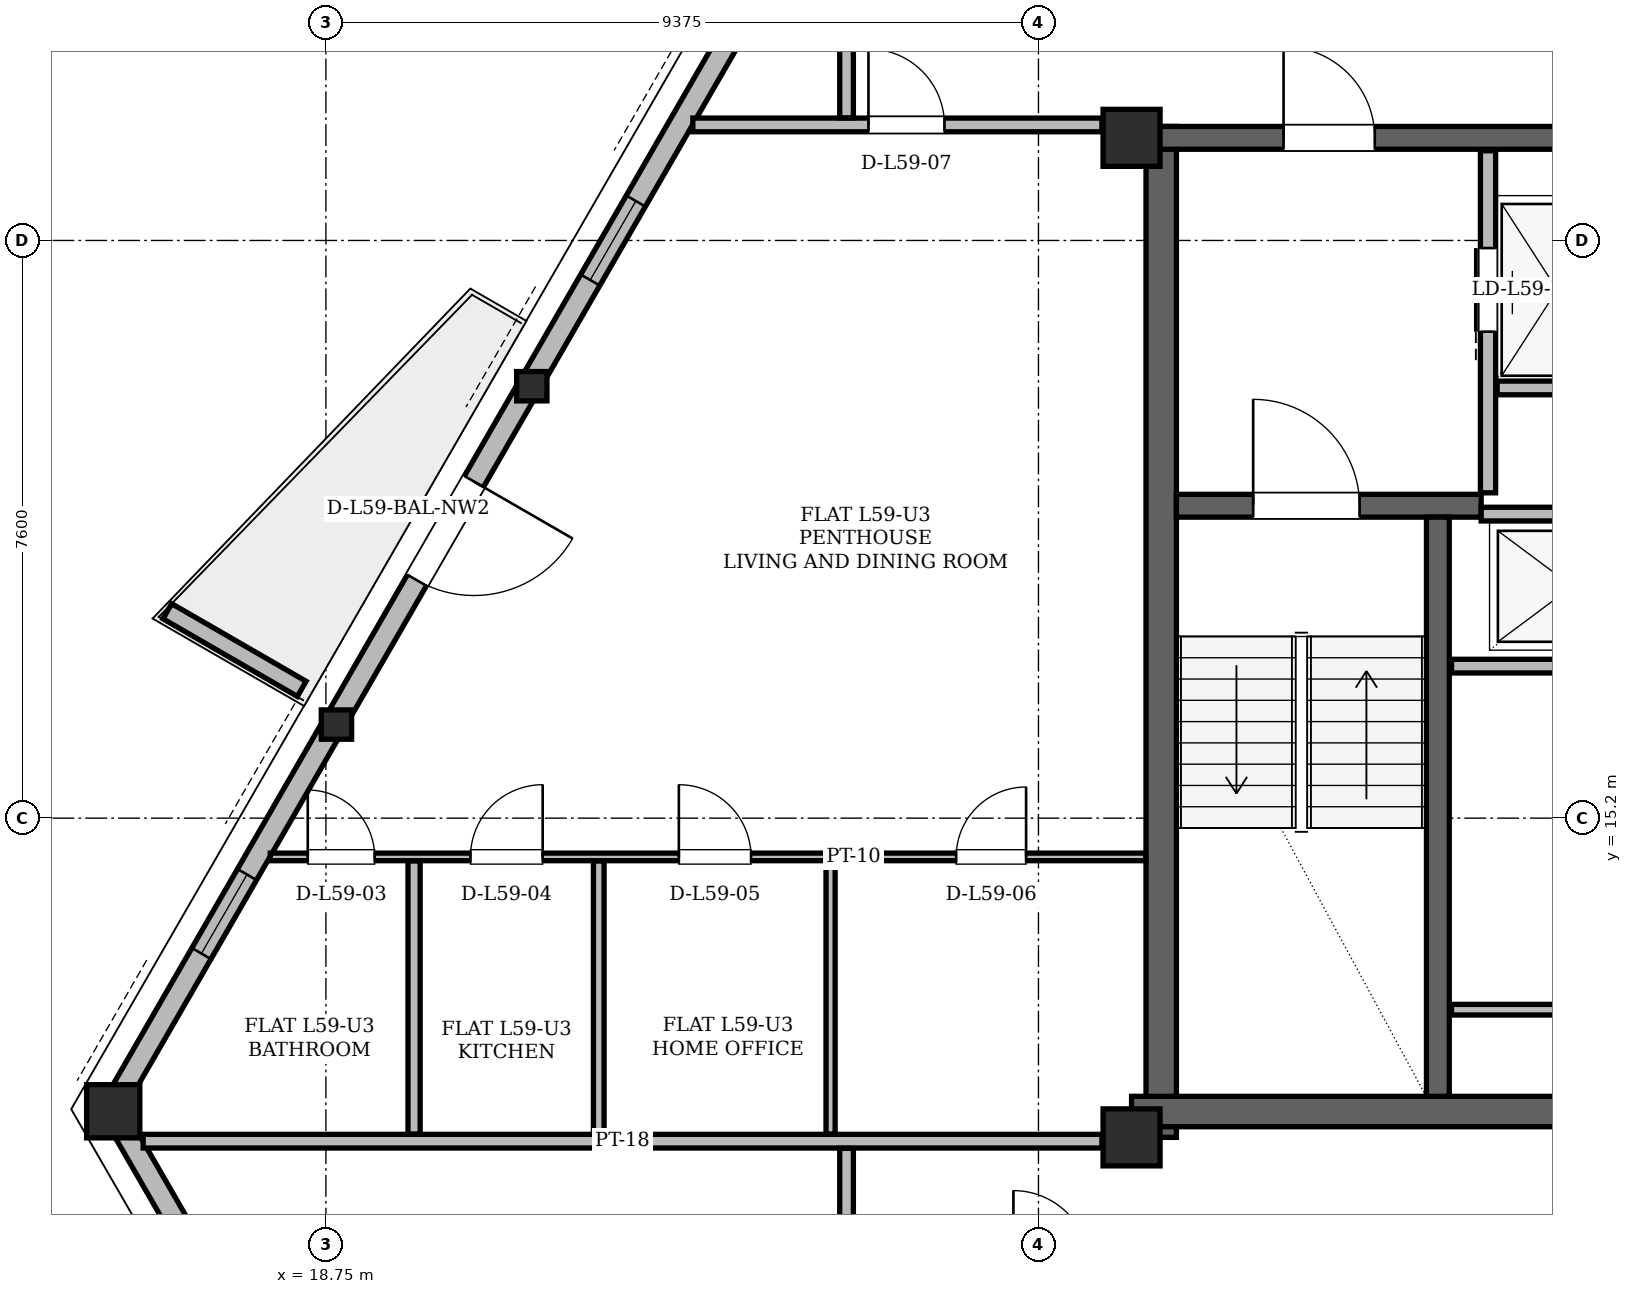
"""IFC4 building model, lengths in metres.
Left out: names, types, materials, properties, quantities, classifications, styles, units other than length and angle.
Written with IfcOpenShell. Run it as: python <this file> out.ifc"""

import sys

from ifc_helpers import new_model, si_unit, direction, frame, frame_2d, origin, origin_2d, place, context, subcontext, project, spatial, polyline, rectangle, hollow_rectangle, i_section, outline, extrude, element, fill, save


model = new_model("IFC4")
c1 = context("Model", 3, precision=1e-05, world=origin(), true_north=direction((0.0, 1.0)))
c2 = subcontext(c1, "Body", "Model", "MODEL_VIEW")
j1 = project(units=[si_unit("LENGTHUNIT", "METRE"), si_unit("PLANEANGLEUNIT", "RADIAN")], contexts=[c1])
p1 = place(None, origin())
s1 = spatial("IfcSite", under=j1, at=p1, CompositionType="ELEMENT")
p2 = place(p1, origin())
s2 = spatial("IfcBuilding", under=s1, at=p2, CompositionType="ELEMENT")
p3 = place(p2, frame((0.0, 0.0, 223.5)))
s3 = spatial("IfcBuildingStorey", under=s2, at=p3, CompositionType="ELEMENT", Elevation=223.5)
for number, where, z_axis, x_axis in (
    (1, (29.35, 11.0, 0.0), (0.0, 0.0, 1.0), (1.0, 0.0, 0.0)),
    (2, (29.35, 24.15, 0.0), (0.0, 0.0, 1.0), (1.0, 0.0, 0.0)),
):
    element("IfcColumn", number, at=place(p3, frame(where, z_axis=z_axis, x_axis=x_axis)), inside=s3, PredefinedType="COLUMN", context=c2, shape_type="SweptSolid", body=[
        extrude(hollow_rectangle(XDim=0.75, YDim=0.75, WallThickness=0.06, at=origin_2d()), origin(), (0.0, 0.0, 1.0), 3.6),
    ])
p4 = place(p3, frame((15.93, 11.372, 0.004), z_axis=(0.01203111998, -0.015565686302, 0.999806462053), x_axis=(0.791209010754, 0.611545829273, 0.0)))
e3 = element("IfcColumn", 3, at=p4, inside=s3, PredefinedType="COLUMN", context=c2, shape_type="SweptSolid", body=[
    extrude(hollow_rectangle(XDim=0.7, YDim=0.7, WallThickness=0.055, at=origin_2d()), origin(), (0.0, 0.0, 1.0), 3.592),
])
p5 = place(p3, frame((21.433, 20.903, 0.004), z_axis=(0.014274554057, -0.011623565446, 0.99983055056), x_axis=(0.63142634321, 0.775435860082, 0.0)))
e4 = element("IfcColumn", 4, at=p5, inside=s3, PredefinedType="COLUMN", context=c2, shape_type="SweptSolid", body=[
    extrude(i_section(OverallWidth=0.399, OverallDepth=0.386, WebThickness=0.021, FlangeThickness=0.033, at=origin_2d()), origin(), (0.0, 0.0, 1.0), 3.592),
])
p6 = place(p3, frame((18.865, 16.455, 0.004), z_axis=(0.01318686239, -0.01345875646, 0.999822468509), x_axis=(0.714284970625, 0.699854971218, 0.0)))
e5 = element("IfcColumn", 5, at=p6, inside=s3, PredefinedType="COLUMN", context=c2, shape_type="SweptSolid", body=[
    extrude(i_section(OverallWidth=0.399, OverallDepth=0.386, WebThickness=0.021, FlangeThickness=0.033, at=origin_2d()), origin(), (0.0, 0.0, 1.0), 3.592),
])
p7 = place(p3, frame((29.74, 11.0, 0.0), z_axis=(0.0, 0.0, 1.0), x_axis=(0.0, 1.0, 0.0)))
e6 = element("IfcWall", 6, at=p7, inside=s3, PredefinedType="SHEAR", context=c2, shape_type="SweptSolid", body=[
    extrude(rectangle(XDim=13.3, YDim=0.4, at=frame_2d((6.65, 0.0))), origin(), (0.0, 0.0, 1.0), 3.38),
])
p8 = place(p3, frame((29.35, 11.34, 0.0), z_axis=(0.0, 0.0, 1.0), x_axis=(1.0, 0.0, 0.0)))
e7 = element("IfcWall", 7, at=p8, inside=s3, PredefinedType="SHEAR", context=c2, shape_type="SweptSolid", body=[
    extrude(rectangle(XDim=7.1, YDim=0.4, at=frame_2d((3.55, 0.0))), origin(), (0.0, 0.0, 1.0), 3.38),
])
p9 = place(p3, frame((29.65, 24.15, 0.0), z_axis=(0.0, 0.0, 1.0), x_axis=(1.0, 0.0, 0.0)))
e8 = element("IfcWall", 8, at=p9, inside=s3, PredefinedType="SHEAR", context=c2, shape_type="SweptSolid", body=[
    extrude(rectangle(XDim=15.7, YDim=0.3, at=frame_2d((7.85, 0.0))), origin(), (0.0, 0.0, 1.0), 3.38),
])
p10 = place(p9, frame((1.7, 0.0, 0.0)))
e9 = element("IfcOpeningElement", 9, at=p10, cuts=e8, PredefinedType="OPENING", context=c2, shape_type="SweptSolid", body=[
    extrude(rectangle(XDim=1.2, YDim=2.2, at=frame_2d((0.6, 1.1))), frame((0.0, 0.15, 0.0), z_axis=(0.0, -1.0, 0.0), x_axis=(1.0, 0.0, 0.0)), (0.0, 0.0, 1.0), 0.3),
])
p11 = place(p9, frame((12.8, 0.0, 0.0)))
e10 = element("IfcOpeningElement", 10, at=p11, cuts=e8, PredefinedType="OPENING", context=c2, shape_type="SweptSolid", body=[
    extrude(rectangle(XDim=1.2, YDim=2.2, at=frame_2d((0.6, 1.1))), frame((0.0, 0.15, 0.0), z_axis=(0.0, -1.0, 0.0), x_axis=(1.0, 0.0, 0.0)), (0.0, 0.0, 1.0), 0.3),
])
p12 = place(p9, frame((6.55, 0.0, 0.0)))
e11 = element("IfcOpeningElement", 11, at=p12, cuts=e8, PredefinedType="OPENING", context=c2, shape_type="SweptSolid", body=[
    extrude(rectangle(XDim=0.9, YDim=2.05, at=frame_2d((0.45, 1.025))), frame((0.0, 0.15, 0.0), z_axis=(0.0, -1.0, 0.0), x_axis=(1.0, 0.0, 0.0)), (0.0, 0.0, 1.0), 0.3),
])
p13 = place(p9, frame((8.45, 0.0, 0.0)))
e12 = element("IfcOpeningElement", 12, at=p13, cuts=e8, PredefinedType="OPENING", context=c2, shape_type="SweptSolid", body=[
    extrude(rectangle(XDim=0.9, YDim=2.05, at=frame_2d((0.45, 1.025))), frame((0.0, 0.15, 0.0), z_axis=(0.0, -1.0, 0.0), x_axis=(1.0, 0.0, 0.0)), (0.0, 0.0, 1.0), 0.3),
])
p14 = place(p3, frame((29.94, 19.31, 0.0), z_axis=(0.0, 0.0, 1.0), x_axis=(1.0, 0.0, 0.0)))
e13 = element("IfcWall", 13, at=p14, inside=s3, PredefinedType="SHEAR", context=c2, shape_type="SweptSolid", body=[
    extrude(rectangle(XDim=4.01, YDim=0.3, at=frame_2d((2.005, 0.0))), origin(), (0.0, 0.0, 1.0), 3.38),
])
p15 = place(p14, frame((1.01, 0.0, 0.0)))
e14 = element("IfcOpeningElement", 14, at=p15, cuts=e13, PredefinedType="OPENING", context=c2, shape_type="SweptSolid", body=[
    extrude(rectangle(XDim=1.4, YDim=2.2, at=frame_2d((0.7, 1.1))), frame((0.0, 0.15, 0.0), z_axis=(0.0, -1.0, 0.0), x_axis=(1.0, 0.0, 0.0)), (0.0, 0.0, 1.0), 0.3),
])
p16 = place(p3, frame((33.38, 11.54, 0.0), z_axis=(0.0, 0.0, 1.0), x_axis=(0.0, 1.0, 0.0)))
e15 = element("IfcWall", 15, at=p16, inside=s3, PredefinedType="SHEAR", context=c2, shape_type="SweptSolid", body=[
    extrude(rectangle(XDim=7.62, YDim=0.3, at=frame_2d((3.81, 0.0))), origin(), (0.0, 0.0, 1.0), 3.38),
])
p17 = place(p3, frame((15.93, 11.372, 0.0), z_axis=(0.0, 0.0, 1.0), x_axis=(0.500005232821, -0.866022382593, 0.0)))
e16 = element("IfcWall", 16, at=p17, inside=s3, PredefinedType="SOLIDWALL", context=c2, shape_type="SweptSolid", body=[
    extrude(rectangle(XDim=6.452, YDim=0.29, at=frame_2d((3.226, 0.0))), origin(), (0.0, 0.0, 1.0), 2.677),
])
p18 = place(p3, frame((34.274, 43.144, 0.0), z_axis=(0.0, 0.0, 1.0), x_axis=(-0.500000292553, -0.866025234879, 0.0)))
e17 = element("IfcWall", 17, at=p18, inside=s3, PredefinedType="SOLIDWALL", context=c2, shape_type="SweptSolid", body=[
    extrude(rectangle(XDim=36.688, YDim=0.29, at=frame_2d((18.344, 0.0))), origin(), (0.0, 0.0, 1.0), 2.677),
])
p19 = place(p18, frame((3.429, 0.0, 0.0)))
e18 = element("IfcOpeningElement", 18, at=p19, cuts=e17, PredefinedType="OPENING", context=c2, shape_type="SweptSolid", body=[
    extrude(rectangle(XDim=1.5, YDim=2.2, at=frame_2d((0.75, 1.1))), frame((0.0, 0.145, 0.0), z_axis=(0.0, -1.0, 0.0), x_axis=(1.0, 0.0, 0.0)), (0.0, 0.0, 1.0), 0.29),
])
p20 = place(p18, frame((27.154, 0.0, 0.0)))
e19 = element("IfcOpeningElement", 19, at=p20, cuts=e17, PredefinedType="OPENING", context=c2, shape_type="SweptSolid", body=[
    extrude(rectangle(XDim=1.5, YDim=2.2, at=frame_2d((0.75, 1.1))), frame((0.0, 0.145, 0.0), z_axis=(0.0, -1.0, 0.0), x_axis=(1.0, 0.0, 0.0)), (0.0, 0.0, 1.0), 0.29),
])
p21 = place(p18, frame((22.893, 0.0, 0.85)))
e20 = element("IfcOpeningElement", 20, at=p21, cuts=e17, PredefinedType="OPENING", context=c2, shape_type="SweptSolid", body=[
    extrude(rectangle(XDim=1.2, YDim=1.48, at=frame_2d((0.6, 0.74))), frame((0.0, 0.145, 0.0), z_axis=(0.0, -1.0, 0.0), x_axis=(1.0, 0.0, 0.0)), (0.0, 0.0, 1.0), 0.29),
])
p22 = place(p18, frame((33.124, 0.0, 0.85)))
e21 = element("IfcOpeningElement", 21, at=p22, cuts=e17, PredefinedType="OPENING", context=c2, shape_type="SweptSolid", body=[
    extrude(rectangle(XDim=1.2, YDim=1.48, at=frame_2d((0.6, 0.74))), frame((0.0, 0.145, 0.0), z_axis=(0.0, -1.0, 0.0), x_axis=(1.0, 0.0, 0.0)), (0.0, 0.0, 1.0), 0.29),
])
p23 = place(p18, frame((8.469, 0.0, 0.85)))
e22 = element("IfcOpeningElement", 22, at=p23, cuts=e17, PredefinedType="OPENING", context=c2, shape_type="SweptSolid", body=[
    extrude(rectangle(XDim=1.2, YDim=1.48, at=frame_2d((0.6, 0.74))), frame((0.0, 0.145, 0.0), z_axis=(0.0, -1.0, 0.0), x_axis=(1.0, 0.0, 0.0)), (0.0, 0.0, 1.0), 0.29),
])
p24 = place(p18, frame((15.521, 0.0, 0.85)))
e23 = element("IfcOpeningElement", 23, at=p24, cuts=e17, PredefinedType="OPENING", context=c2, shape_type="SweptSolid", body=[
    extrude(rectangle(XDim=2.8, YDim=1.717, at=frame_2d((1.4, 0.858))), frame((0.0, 0.145, 0.0), z_axis=(0.0, -1.0, 0.0), x_axis=(1.0, 0.0, 0.0)), (0.0, 0.0, 1.0), 0.29),
])
p25 = place(p18, frame((1.499, 0.0, 0.85)))
e24 = element("IfcOpeningElement", 24, at=p25, cuts=e17, PredefinedType="OPENING", context=c2, shape_type="SweptSolid", body=[
    extrude(rectangle(XDim=1.2, YDim=1.48, at=frame_2d((0.6, 0.74))), frame((0.0, 0.145, 0.0), z_axis=(0.0, -1.0, 0.0), x_axis=(1.0, 0.0, 0.0)), (0.0, 0.0, 1.0), 0.29),
])
p26 = place(p3, frame((18.432, 16.901, 0.0), z_axis=(0.0, 0.0, 1.0), x_axis=(-0.866042246008, 0.499970827278, 0.0)))
e25 = element("IfcWall", 25, at=p26, inside=s3, PredefinedType="PARAPET", context=c2, shape_type="SweptSolid", body=[
    extrude(outline(polyline([(0.0, 0.0), (2.042, 0.0), (2.042, 1.1), (0.0, 1.32), (0.0, 0.0)])), frame((0.0, 0.115, 0.0), z_axis=(0.0, -1.0, 0.0), x_axis=(1.0, 0.0, 0.0)), (0.0, 0.0, 1.0), 0.23),
])
p27 = place(p3, frame((34.04, 19.48, 0.0), z_axis=(0.0, 0.0, 1.0), x_axis=(0.0, 1.0, 0.0)))
e26 = element("IfcWall", 26, at=p27, inside=s3, PredefinedType="PARTITIONING", context=c2, shape_type="SweptSolid", body=[
    extrude(rectangle(XDim=4.5, YDim=0.2, at=frame_2d((2.25, 0.0))), origin(), (0.0, 0.0, 1.0), 3.38),
])
p28 = place(p27, frame((2.12, 0.0, 0.0)))
e27 = element("IfcOpeningElement", 27, at=p28, cuts=e26, PredefinedType="OPENING", context=c2, shape_type="SweptSolid", body=[
    extrude(rectangle(XDim=1.1, YDim=2.2, at=frame_2d((0.55, 1.1))), frame((0.0, 0.1, 0.0), z_axis=(0.0, -1.0, 0.0), x_axis=(1.0, 0.0, 0.0)), (0.0, 0.0, 1.0), 0.2),
])
p29 = place(p3, frame((34.16, 20.86, 0.0), z_axis=(0.0, 0.0, 1.0), x_axis=(1.0, 0.0, 0.0)))
e28 = element("IfcWall", 28, at=p29, inside=s3, PredefinedType="PARTITIONING", context=c2, shape_type="SweptSolid", body=[
    extrude(rectangle(XDim=1.58, YDim=0.18, at=frame_2d((0.79, 0.0))), origin(), (0.0, 0.0, 1.0), 3.38),
])
p30 = place(p3, frame((33.95, 19.2, 0.0), z_axis=(0.0, 0.0, 1.0), x_axis=(1.0, 0.0, 0.0)))
e29 = element("IfcWall", 29, at=p30, inside=s3, PredefinedType="PARTITIONING", context=c2, shape_type="SweptSolid", body=[
    extrude(rectangle(XDim=2.27, YDim=0.18, at=frame_2d((1.135, 0.0))), origin(), (0.0, 0.0, 1.0), 3.38),
])
p31 = place(p3, frame((33.56, 17.2, 0.0), z_axis=(0.0, 0.0, 1.0), x_axis=(1.0, 0.0, 0.0)))
e30 = element("IfcWall", 30, at=p31, inside=s3, PredefinedType="PARTITIONING", context=c2, shape_type="SweptSolid", body=[
    extrude(rectangle(XDim=2.66, YDim=0.18, at=frame_2d((1.33, 0.0))), origin(), (0.0, 0.0, 1.0), 3.38),
])
p32 = place(p3, frame((33.56, 12.68, 0.0), z_axis=(0.0, 0.0, 1.0), x_axis=(1.0, 0.0, 0.0)))
e31 = element("IfcWall", 31, at=p32, inside=s3, PredefinedType="PARTITIONING", context=c2, shape_type="SweptSolid", body=[
    extrude(rectangle(XDim=2.66, YDim=0.14, at=frame_2d((1.33, 0.0))), origin(), (0.0, 0.0, 1.0), 3.38),
])
p33 = place(p3, frame((16.345, 10.95, 0.0), z_axis=(0.0, 0.0, 1.0), x_axis=(1.0, 0.0, 0.0)))
e32 = element("IfcWall", 32, at=p33, inside=s3, PredefinedType="PARTITIONING", context=c2, shape_type="SweptSolid", body=[
    extrude(rectangle(XDim=12.615, YDim=0.18, at=frame_2d((6.307, 0.0))), origin(), (0.0, 0.0, 1.0), 2.913),
])
p34 = place(p3, frame((18.018, 14.69, 0.0), z_axis=(0.0, 0.0, 1.0), x_axis=(1.0, 0.0, 0.0)))
e33 = element("IfcWall", 33, at=p34, inside=s3, PredefinedType="PARTITIONING", context=c2, shape_type="SweptSolid", body=[
    extrude(rectangle(XDim=11.518, YDim=0.1, at=frame_2d((5.759, 0.0))), origin(), (0.0, 0.0, 1.0), 2.52),
])
p35 = place(p34, frame((0.493, 0.0, 0.0)))
e34 = element("IfcOpeningElement", 34, at=p35, cuts=e33, PredefinedType="OPENING", context=c2, shape_type="SweptSolid", body=[
    extrude(rectangle(XDim=0.88, YDim=2.08, at=frame_2d((0.44, 1.04))), frame((0.0, 0.05, 0.0), z_axis=(0.0, -1.0, 0.0), x_axis=(1.0, 0.0, 0.0)), (0.0, 0.0, 1.0), 0.1),
])
p36 = place(p34, frame((2.634, 0.0, 0.0)))
e35 = element("IfcOpeningElement", 35, at=p36, cuts=e33, PredefinedType="OPENING", context=c2, shape_type="SweptSolid", body=[
    extrude(rectangle(XDim=0.95, YDim=2.1, at=frame_2d((0.475, 1.05))), frame((0.0, 0.05, 0.0), z_axis=(0.0, -1.0, 0.0), x_axis=(1.0, 0.0, 0.0)), (0.0, 0.0, 1.0), 0.1),
])
p37 = place(p34, frame((5.376, 0.0, 0.0)))
e36 = element("IfcOpeningElement", 36, at=p37, cuts=e33, PredefinedType="OPENING", context=c2, shape_type="SweptSolid", body=[
    extrude(rectangle(XDim=0.95, YDim=2.1, at=frame_2d((0.475, 1.05))), frame((0.0, 0.05, 0.0), z_axis=(0.0, -1.0, 0.0), x_axis=(1.0, 0.0, 0.0)), (0.0, 0.0, 1.0), 0.1),
])
p38 = place(p34, frame((9.024, 0.0, 0.0)))
e37 = element("IfcOpeningElement", 37, at=p38, cuts=e33, PredefinedType="OPENING", context=c2, shape_type="SweptSolid", body=[
    extrude(rectangle(XDim=0.92, YDim=2.12, at=frame_2d((0.46, 1.06))), frame((0.0, 0.05, 0.0), z_axis=(0.0, -1.0, 0.0), x_axis=(1.0, 0.0, 0.0)), (0.0, 0.0, 1.0), 0.1),
])
p39 = place(p3, frame((23.578, 24.32, 0.0), z_axis=(0.0, 0.0, 1.0), x_axis=(1.0, 0.0, 0.0)))
e38 = element("IfcWall", 38, at=p39, inside=s3, PredefinedType="PARTITIONING", context=c2, shape_type="SweptSolid", body=[
    extrude(rectangle(XDim=5.382, YDim=0.18, at=frame_2d((2.691, 0.0))), origin(), (0.0, 0.0, 1.0), 3.38),
])
p40 = place(p39, frame((2.31, 0.0, 0.0)))
e39 = element("IfcOpeningElement", 39, at=p40, cuts=e38, PredefinedType="OPENING", context=c2, shape_type="SweptSolid", body=[
    extrude(rectangle(XDim=1.0, YDim=2.18, at=frame_2d((0.5, 1.09))), frame((0.0, 0.09, 0.0), z_axis=(0.0, -1.0, 0.0), x_axis=(1.0, 0.0, 0.0)), (0.0, 0.0, 1.0), 0.18),
])
p41 = place(p3, frame((19.91, 11.044, 0.0), z_axis=(0.0, 0.0, 1.0), x_axis=(0.0, 1.0, 0.0)))
e40 = element("IfcWall", 40, at=p41, inside=s3, PredefinedType="PARTITIONING", context=c2, shape_type="SweptSolid", body=[
    extrude(rectangle(XDim=3.592, YDim=0.16, at=frame_2d((1.796, 0.0))), origin(), (0.0, 0.0, 1.0), 2.913),
])
p42 = place(p3, frame((22.34, 11.044, 0.0), z_axis=(0.0, 0.0, 1.0), x_axis=(0.0, 1.0, 0.0)))
e41 = element("IfcWall", 41, at=p42, inside=s3, PredefinedType="PARTITIONING", context=c2, shape_type="SweptSolid", body=[
    extrude(rectangle(XDim=3.592, YDim=0.14, at=frame_2d((1.796, 0.0))), origin(), (0.0, 0.0, 1.0), 2.913),
])
p43 = place(p3, frame((25.39, 11.044, 0.0), z_axis=(0.0, 0.0, 1.0), x_axis=(0.0, 1.0, 0.0)))
e42 = element("IfcWall", 42, at=p43, inside=s3, PredefinedType="PARTITIONING", context=c2, shape_type="SweptSolid", body=[
    extrude(rectangle(XDim=3.592, YDim=0.12, at=frame_2d((1.796, 0.0))), origin(), (0.0, 0.0, 1.0), 3.38),
])
for number, where, z_axis, x_axis in (
    (43, (25.6, 9.394, 0.0), (0.0, 0.0, 1.0), (0.0, 1.0, 0.0)),
    (44, (25.6, 24.414, 0.0), (0.0, 0.0, 1.0), (0.0, 1.0, 0.0)),
):
    element("IfcWall", number, at=place(p3, frame(where, z_axis=z_axis, x_axis=x_axis)), inside=s3, PredefinedType="PARTITIONING", context=c2, shape_type="SweptSolid", body=[
        extrude(rectangle(XDim=1.462, YDim=0.18, at=frame_2d((0.731, 0.0))), origin(), (0.0, 0.0, 1.0), 3.38),
    ])
p44 = place(p20, origin())
e45 = element("IfcDoor", 45, at=p44, inside=s3, OperationType="SINGLE_SWING_LEFT", PredefinedType="DOOR", context=c2, shape_type="SweptSolid", body=[
    extrude(rectangle(XDim=1.5, YDim=2.2, at=frame_2d((0.75, 1.1))), frame((0.0, 0.025, 0.0), z_axis=(0.0, -1.0, 0.0), x_axis=(1.0, 0.0, 0.0)), (0.0, 0.0, 1.0), 0.05),
])
fill(e19, e45)
p45 = place(p21, origin())
e46 = element("IfcWindow", 46, at=p45, inside=s3, PartitioningType="SINGLE_PANEL", PredefinedType="WINDOW", context=c2, shape_type="SweptSolid", body=[
    extrude(rectangle(XDim=1.2, YDim=1.48, at=frame_2d((0.6, 0.74))), frame((0.0, 0.03, 0.0), z_axis=(0.0, -1.0, 0.0), x_axis=(1.0, 0.0, 0.0)), (0.0, 0.0, 1.0), 0.06),
])
fill(e20, e46)
p46 = place(p22, origin())
e47 = element("IfcWindow", 47, at=p46, inside=s3, PartitioningType="SINGLE_PANEL", PredefinedType="WINDOW", context=c2, shape_type="SweptSolid", body=[
    extrude(rectangle(XDim=1.2, YDim=1.48, at=frame_2d((0.6, 0.74))), frame((0.0, 0.03, 0.0), z_axis=(0.0, -1.0, 0.0), x_axis=(1.0, 0.0, 0.0)), (0.0, 0.0, 1.0), 0.06),
])
fill(e21, e47)
p47 = place(p28, origin())
e48 = element("IfcDoor", 48, at=p47, inside=s3, OperationType="SLIDING_TO_LEFT", PredefinedType="DOOR", context=c2, shape_type="SweptSolid", body=[
    extrude(rectangle(XDim=1.1, YDim=2.2, at=frame_2d((0.55, 1.1))), frame((0.0, 0.025, 0.0), z_axis=(0.0, -1.0, 0.0), x_axis=(1.0, 0.0, 0.0)), (0.0, 0.0, 1.0), 0.05),
])
fill(e27, e48)
p48 = place(p15, origin())
e49 = element("IfcDoor", 49, at=p48, inside=s3, OperationType="SINGLE_SWING_LEFT", PredefinedType="DOOR", context=c2, shape_type="SweptSolid", body=[
    extrude(rectangle(XDim=1.4, YDim=2.2, at=frame_2d((0.7, 1.1))), frame((0.0, 0.025, 0.0), z_axis=(0.0, -1.0, 0.0), x_axis=(1.0, 0.0, 0.0)), (0.0, 0.0, 1.0), 0.05),
])
fill(e14, e49)
p49 = place(p10, origin())
e50 = element("IfcDoor", 50, at=p49, inside=s3, OperationType="SINGLE_SWING_LEFT", PredefinedType="DOOR", context=c2, shape_type="SweptSolid", body=[
    extrude(rectangle(XDim=1.2, YDim=2.2, at=frame_2d((0.6, 1.1))), frame((0.0, 0.025, 0.0), z_axis=(0.0, -1.0, 0.0), x_axis=(1.0, 0.0, 0.0)), (0.0, 0.0, 1.0), 0.05),
])
fill(e9, e50)
p50 = place(p35, origin())
e51 = element("IfcDoor", 51, at=p50, inside=s3, OperationType="SINGLE_SWING_LEFT", PredefinedType="DOOR", context=c2, shape_type="SweptSolid", body=[
    extrude(rectangle(XDim=0.88, YDim=2.08, at=frame_2d((0.44, 1.04))), frame((0.0, 0.025, 0.0), z_axis=(0.0, -1.0, 0.0), x_axis=(1.0, 0.0, 0.0)), (0.0, 0.0, 1.0), 0.05),
])
fill(e34, e51)
p51 = place(p36, origin())
e52 = element("IfcDoor", 52, at=p51, inside=s3, OperationType="SINGLE_SWING_RIGHT", PredefinedType="DOOR", context=c2, shape_type="SweptSolid", body=[
    extrude(rectangle(XDim=0.95, YDim=2.1, at=frame_2d((0.475, 1.05))), frame((0.0, 0.025, 0.0), z_axis=(0.0, -1.0, 0.0), x_axis=(1.0, 0.0, 0.0)), (0.0, 0.0, 1.0), 0.05),
])
fill(e35, e52)
p52 = place(p37, origin())
e53 = element("IfcDoor", 53, at=p52, inside=s3, OperationType="SINGLE_SWING_LEFT", PredefinedType="DOOR", context=c2, shape_type="SweptSolid", body=[
    extrude(rectangle(XDim=0.95, YDim=2.1, at=frame_2d((0.475, 1.05))), frame((0.0, 0.025, 0.0), z_axis=(0.0, -1.0, 0.0), x_axis=(1.0, 0.0, 0.0)), (0.0, 0.0, 1.0), 0.05),
])
fill(e36, e53)
p53 = place(p38, origin())
e54 = element("IfcDoor", 54, at=p53, inside=s3, OperationType="SINGLE_SWING_RIGHT", PredefinedType="DOOR", context=c2, shape_type="SweptSolid", body=[
    extrude(rectangle(XDim=0.92, YDim=2.12, at=frame_2d((0.46, 1.06))), frame((0.0, 0.025, 0.0), z_axis=(0.0, -1.0, 0.0), x_axis=(1.0, 0.0, 0.0)), (0.0, 0.0, 1.0), 0.05),
])
fill(e37, e54)
p54 = place(p40, origin())
e55 = element("IfcDoor", 55, at=p54, inside=s3, OperationType="SINGLE_SWING_LEFT", PredefinedType="DOOR", context=c2, shape_type="SweptSolid", body=[
    extrude(rectangle(XDim=1.0, YDim=2.18, at=frame_2d((0.5, 1.09))), frame((0.0, 0.025, 0.0), z_axis=(0.0, -1.0, 0.0), x_axis=(1.0, 0.0, 0.0)), (0.0, 0.0, 1.0), 0.05),
])
fill(e39, e55)
save(model, sys.argv[1])
